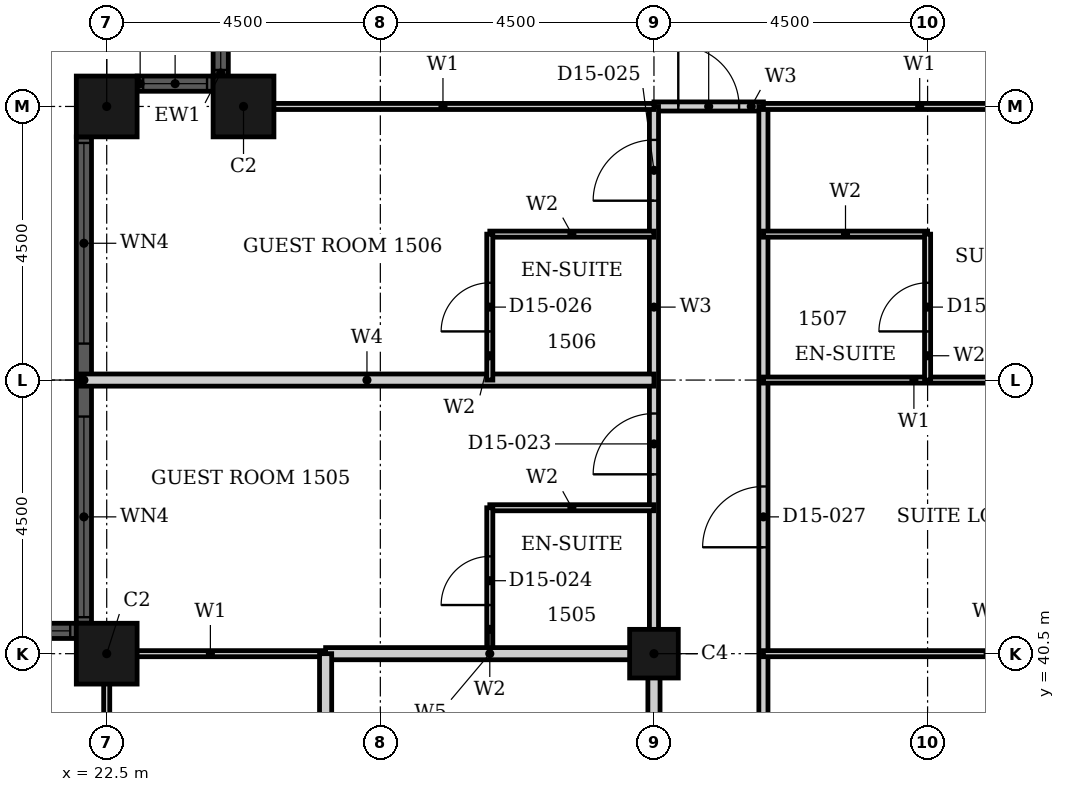
"""IFC4 building model, lengths in metres.
Left out: names, types, materials, properties, quantities, classifications, styles, units other than length and angle.
Written with IfcOpenShell. Run it as: python <this file> out.ifc"""

import sys

from ifc_helpers import new_model, si_unit, direction, frame, frame_2d, origin, origin_2d, place, context, subcontext, project, spatial, rectangle, hollow_rectangle, extrude, element, fill, save


model = new_model("IFC4")
c1 = context("Model", 3, precision=1e-05, world=origin(), true_north=direction((0.0, 1.0)))
c2 = subcontext(c1, "Body", "Model", "MODEL_VIEW")
j1 = project(units=[si_unit("LENGTHUNIT", "METRE"), si_unit("PLANEANGLEUNIT", "RADIAN")], contexts=[c1])
p1 = place(None, origin())
s1 = spatial("IfcSite", under=j1, at=p1, CompositionType="ELEMENT")
p2 = place(p1, origin())
s2 = spatial("IfcBuilding", under=s1, at=p2, CompositionType="ELEMENT")
p3 = place(p2, frame((0.0, 0.0, 67.2)))
s3 = spatial("IfcBuildingStorey", under=s2, at=p3, CompositionType="ELEMENT", Elevation=67.2)
for number, where, z_axis, x_axis in (
    (1, (24.75, 49.5, 0.0), (0.0, 0.0, 1.0), (1.0, 0.0, 0.0)),
    (2, (22.5, 49.5, 0.0), (0.0, 0.0, 1.0), (1.0, 0.0, 0.0)),
    (3, (22.5, 40.5, 0.0), (0.0, 0.0, 1.0), (1.0, 0.0, 0.0)),
):
    element("IfcColumn", number, at=place(p3, frame(where, z_axis=z_axis, x_axis=x_axis)), inside=s3, PredefinedType="COLUMN", context=c2, shape_type="SweptSolid", body=[
        extrude(hollow_rectangle(XDim=1.0, YDim=1.0, WallThickness=0.032, at=origin_2d()), origin(), (0.0, 0.0, 1.0), 3.6),
    ])
p4 = place(p3, frame((31.5, 40.5, 0.0), z_axis=(0.0, 0.0, 1.0), x_axis=(1.0, 0.0, 0.0)))
e4 = element("IfcColumn", 4, at=p4, inside=s3, PredefinedType="COLUMN", context=c2, shape_type="SweptSolid", body=[
    extrude(hollow_rectangle(XDim=0.8, YDim=0.8, WallThickness=0.025, at=origin_2d()), origin(), (0.0, 0.0, 1.0), 3.6),
])
p5 = place(p3, frame((24.375, 51.25, 0.0), z_axis=(0.0, 0.0, 1.0), x_axis=(0.0, -1.0, 0.0)))
e5 = element("IfcWall", 5, at=p5, inside=s3, PredefinedType="SOLIDWALL", context=c2, shape_type="SweptSolid", body=[
    extrude(rectangle(XDim=1.25, YDim=0.25, at=frame_2d((0.625, 0.0))), origin(), (0.0, 0.0, 1.0), 3.6),
])
p6 = place(p5, frame((0.1, 0.0, 0.9)))
e6 = element("IfcOpeningElement", 6, at=p6, cuts=e5, PredefinedType="OPENING", context=c2, shape_type="SweptSolid", body=[
    extrude(rectangle(XDim=1.05, YDim=2.08, at=frame_2d((0.525, 1.04))), frame((0.0, 0.135, 0.0), z_axis=(0.0, -1.0, 0.0), x_axis=(1.0, 0.0, 0.0)), (0.0, 0.0, 1.0), 0.27),
])
p7 = place(p3, frame((24.25, 49.875, 0.0), z_axis=(0.0, 0.0, 1.0), x_axis=(-1.0, 0.0, 0.0)))
e7 = element("IfcWall", 7, at=p7, inside=s3, PredefinedType="SOLIDWALL", context=c2, shape_type="SweptSolid", body=[
    extrude(rectangle(XDim=1.25, YDim=0.25, at=frame_2d((0.625, 0.0))), origin(), (0.0, 0.0, 1.0), 3.6),
])
p8 = place(p7, frame((0.1, 0.0, 0.9)))
e8 = element("IfcOpeningElement", 8, at=p8, cuts=e7, PredefinedType="OPENING", context=c2, shape_type="SweptSolid", body=[
    extrude(rectangle(XDim=1.05, YDim=2.08, at=frame_2d((0.525, 1.04))), frame((0.0, 0.135, 0.0), z_axis=(0.0, -1.0, 0.0), x_axis=(1.0, 0.0, 0.0)), (0.0, 0.0, 1.0), 0.27),
])
p9 = place(p3, frame((22.125, 49.0, 0.0), z_axis=(0.0, 0.0, 1.0), x_axis=(0.0, -1.0, 0.0)))
e9 = element("IfcWall", 9, at=p9, inside=s3, PredefinedType="SOLIDWALL", context=c2, shape_type="SweptSolid", body=[
    extrude(rectangle(XDim=8.0, YDim=0.25, at=frame_2d((4.0, 0.0))), origin(), (0.0, 0.0, 1.0), 3.6),
])
p10 = place(p9, frame((0.1, 0.0, 0.9)))
e10 = element("IfcOpeningElement", 10, at=p10, cuts=e9, PredefinedType="OPENING", context=c2, shape_type="SweptSolid", body=[
    extrude(rectangle(XDim=3.3, YDim=2.08, at=frame_2d((1.65, 1.04))), frame((0.0, 0.135, 0.0), z_axis=(0.0, -1.0, 0.0), x_axis=(1.0, 0.0, 0.0)), (0.0, 0.0, 1.0), 0.27),
])
p11 = place(p9, frame((4.6, 0.0, 0.9)))
e11 = element("IfcOpeningElement", 11, at=p11, cuts=e9, PredefinedType="OPENING", context=c2, shape_type="SweptSolid", body=[
    extrude(rectangle(XDim=3.3, YDim=2.08, at=frame_2d((1.65, 1.04))), frame((0.0, 0.135, 0.0), z_axis=(0.0, -1.0, 0.0), x_axis=(1.0, 0.0, 0.0)), (0.0, 0.0, 1.0), 0.27),
])
p12 = place(p3, frame((22.0, 40.875, 0.0), z_axis=(0.0, 0.0, 1.0), x_axis=(-1.0, 0.0, 0.0)))
e12 = element("IfcWall", 12, at=p12, inside=s3, PredefinedType="SOLIDWALL", context=c2, shape_type="SweptSolid", body=[
    extrude(rectangle(XDim=3.5, YDim=0.25, at=frame_2d((1.75, 0.0))), origin(), (0.0, 0.0, 1.0), 3.6),
])
p13 = place(p12, frame((0.1, 0.0, 0.9)))
e13 = element("IfcOpeningElement", 13, at=p13, cuts=e12, PredefinedType="OPENING", context=c2, shape_type="SweptSolid", body=[
    extrude(rectangle(XDim=3.3, YDim=2.08, at=frame_2d((1.65, 1.04))), frame((0.0, 0.135, 0.0), z_axis=(0.0, -1.0, 0.0), x_axis=(1.0, 0.0, 0.0)), (0.0, 0.0, 1.0), 0.27),
])
p14 = place(p3, frame((31.5, 49.5, 0.0), z_axis=(0.0, 0.0, 1.0), x_axis=(1.0, 0.0, 0.0)))
e14 = element("IfcWall", 14, at=p14, inside=s3, PredefinedType="PARTITIONING", context=c2, shape_type="SweptSolid", body=[
    extrude(rectangle(XDim=1.8, YDim=0.15, at=frame_2d((0.9, 0.0))), origin(), (0.0, 0.0, 1.0), 3.3),
])
p15 = place(p14, frame((0.4, 0.0, 0.0)))
e15 = element("IfcOpeningElement", 15, at=p15, cuts=e14, PredefinedType="OPENING", context=c2, shape_type="SweptSolid", body=[
    extrude(rectangle(XDim=1.0, YDim=2.1, at=frame_2d((0.5, 1.05))), frame((0.0, 0.085, 0.0), z_axis=(0.0, -1.0, 0.0), x_axis=(1.0, 0.0, 0.0)), (0.0, 0.0, 1.0), 0.17),
])
p16 = place(p3, frame((31.5, 40.5, 0.0), z_axis=(0.0, 0.0, 1.0), x_axis=(0.0, 1.0, 0.0)))
e16 = element("IfcWall", 16, at=p16, inside=s3, PredefinedType="PARTITIONING", context=c2, shape_type="SweptSolid", body=[
    extrude(rectangle(XDim=9.0, YDim=0.15, at=frame_2d((4.5, 0.0))), origin(), (0.0, 0.0, 1.0), 2.58),
])
p17 = place(p16, frame((2.95, 0.0, 0.0)))
e17 = element("IfcOpeningElement", 17, at=p17, cuts=e16, PredefinedType="OPENING", context=c2, shape_type="SweptSolid", body=[
    extrude(rectangle(XDim=1.0, YDim=2.1, at=frame_2d((0.5, 1.05))), frame((0.0, 0.085, 0.0), z_axis=(0.0, -1.0, 0.0), x_axis=(1.0, 0.0, 0.0)), (0.0, 0.0, 1.0), 0.17),
])
p18 = place(p16, frame((7.45, 0.0, 0.0)))
e18 = element("IfcOpeningElement", 18, at=p18, cuts=e16, PredefinedType="OPENING", context=c2, shape_type="SweptSolid", body=[
    extrude(rectangle(XDim=1.0, YDim=2.1, at=frame_2d((0.5, 1.05))), frame((0.0, 0.085, 0.0), z_axis=(0.0, -1.0, 0.0), x_axis=(1.0, 0.0, 0.0)), (0.0, 0.0, 1.0), 0.17),
])
p19 = place(p3, frame((33.3, 33.3, 0.0), z_axis=(0.0, 0.0, 1.0), x_axis=(0.0, 1.0, 0.0)))
e19 = element("IfcWall", 19, at=p19, inside=s3, PredefinedType="PARTITIONING", context=c2, shape_type="SweptSolid", body=[
    extrude(rectangle(XDim=16.2, YDim=0.15, at=frame_2d((8.1, 0.0))), origin(), (0.0, 0.0, 1.0), 3.3),
])
p20 = place(p19, frame((8.95, 0.0, 0.0)))
e20 = element("IfcOpeningElement", 20, at=p20, cuts=e19, PredefinedType="OPENING", context=c2, shape_type="SweptSolid", body=[
    extrude(rectangle(XDim=1.0, YDim=2.1, at=frame_2d((0.5, 1.05))), frame((0.0, 0.085, 0.0), z_axis=(0.0, -1.0, 0.0), x_axis=(1.0, 0.0, 0.0)), (0.0, 0.0, 1.0), 0.17),
])
p21 = place(p3, frame((22.31, 40.5, 0.0), z_axis=(0.0, 0.0, 1.0), x_axis=(1.0, 0.0, 0.0)))
e21 = element("IfcWall", 21, at=p21, inside=s3, PredefinedType="PARTITIONING", context=c2, shape_type="SweptSolid", body=[
    extrude(rectangle(XDim=3.79, YDim=0.1, at=frame_2d((1.895, 0.0))), origin(), (0.0, 0.0, 1.0), 2.38),
])
p22 = place(p3, frame((33.3, 40.5, 0.0), z_axis=(0.0, 0.0, 1.0), x_axis=(1.0, 0.0, 0.0)))
e22 = element("IfcWall", 22, at=p22, inside=s3, PredefinedType="PARTITIONING", context=c2, shape_type="SweptSolid", body=[
    extrude(rectangle(XDim=7.39, YDim=0.1, at=frame_2d((3.695, 0.0))), origin(), (0.0, 0.0, 1.0), 2.38),
])
p23 = place(p3, frame((33.3, 45.0, 0.0), z_axis=(0.0, 0.0, 1.0), x_axis=(1.0, 0.0, 0.0)))
e23 = element("IfcWall", 23, at=p23, inside=s3, PredefinedType="PARTITIONING", context=c2, shape_type="SweptSolid", body=[
    extrude(rectangle(XDim=7.64, YDim=0.1, at=frame_2d((3.82, 0.0))), origin(), (0.0, 0.0, 1.0), 3.3),
])
p24 = place(p23, frame((4.95, 0.0, 0.0)))
e24 = element("IfcOpeningElement", 24, at=p24, cuts=e23, PredefinedType="OPENING", context=c2, shape_type="SweptSolid", body=[
    extrude(rectangle(XDim=0.9, YDim=2.1, at=frame_2d((0.45, 1.05))), frame((0.0, 0.06, 0.0), z_axis=(0.0, -1.0, 0.0), x_axis=(1.0, 0.0, 0.0)), (0.0, 0.0, 1.0), 0.12),
])
p25 = place(p3, frame((24.56, 49.5, 0.0), z_axis=(0.0, 0.0, 1.0), x_axis=(1.0, 0.0, 0.0)))
e25 = element("IfcWall", 25, at=p25, inside=s3, PredefinedType="PARTITIONING", context=c2, shape_type="SweptSolid", body=[
    extrude(rectangle(XDim=6.94, YDim=0.1, at=frame_2d((3.47, 0.0))), origin(), (0.0, 0.0, 1.0), 3.3),
])
p26 = place(p3, frame((33.3, 49.5, 0.0), z_axis=(0.0, 0.0, 1.0), x_axis=(1.0, 0.0, 0.0)))
e26 = element("IfcWall", 26, at=p26, inside=s3, PredefinedType="PARTITIONING", context=c2, shape_type="SweptSolid", body=[
    extrude(rectangle(XDim=5.14, YDim=0.1, at=frame_2d((2.57, 0.0))), origin(), (0.0, 0.0, 1.0), 3.3),
])
p27 = place(p3, frame((22.5, 33.3, 0.0), z_axis=(0.0, 0.0, 1.0), x_axis=(0.0, 1.0, 0.0)))
e27 = element("IfcWall", 27, at=p27, inside=s3, PredefinedType="PARTITIONING", context=c2, shape_type="SweptSolid", body=[
    extrude(rectangle(XDim=7.39, YDim=0.1, at=frame_2d((3.695, 0.0))), origin(), (0.0, 0.0, 1.0), 3.3),
])
p28 = place(p3, frame((22.06, 45.0, 0.0), z_axis=(0.0, 0.0, 1.0), x_axis=(1.0, 0.0, 0.0)))
e28 = element("IfcWall", 28, at=p28, inside=s3, PredefinedType="PARTITIONING", context=c2, shape_type="SweptSolid", body=[
    extrude(rectangle(XDim=9.44, YDim=0.2, at=frame_2d((4.72, 0.0))), origin(), (0.0, 0.0, 1.0), 3.3),
])
for number, where, z_axis, x_axis in (
    (29, (28.8, 42.9, 0.0), (0.0, 0.0, 1.0), (1.0, 0.0, 0.0)),
    (30, (28.8, 47.4, 0.0), (0.0, 0.0, 1.0), (1.0, 0.0, 0.0)),
    (31, (33.3, 47.4, 0.0), (0.0, 0.0, 1.0), (1.0, 0.0, 0.0)),
):
    element("IfcWall", number, at=place(p3, frame(where, z_axis=z_axis, x_axis=x_axis)), inside=s3, PredefinedType="PARTITIONING", context=c2, shape_type="SweptSolid", body=[
        extrude(rectangle(XDim=2.7, YDim=0.1, at=frame_2d((1.35, 0.0))), origin(), (0.0, 0.0, 1.0), 3.3),
    ])
p29 = place(p3, frame((28.8, 40.5, 0.0), z_axis=(0.0, 0.0, 1.0), x_axis=(0.0, 1.0, 0.0)))
e32 = element("IfcWall", 32, at=p29, inside=s3, PredefinedType="PARTITIONING", context=c2, shape_type="SweptSolid", body=[
    extrude(rectangle(XDim=2.4, YDim=0.1, at=frame_2d((1.2, 0.0))), origin(), (0.0, 0.0, 1.0), 3.3),
])
p30 = place(p29, frame((0.8, 0.0, 0.0)))
e33 = element("IfcOpeningElement", 33, at=p30, cuts=e32, PredefinedType="OPENING", context=c2, shape_type="SweptSolid", body=[
    extrude(rectangle(XDim=0.8, YDim=2.1, at=frame_2d((0.4, 1.05))), frame((0.0, 0.06, 0.0), z_axis=(0.0, -1.0, 0.0), x_axis=(1.0, 0.0, 0.0)), (0.0, 0.0, 1.0), 0.12),
])
p31 = place(p3, frame((28.8, 45.0, 0.0), z_axis=(0.0, 0.0, 1.0), x_axis=(0.0, 1.0, 0.0)))
e34 = element("IfcWall", 34, at=p31, inside=s3, PredefinedType="PARTITIONING", context=c2, shape_type="SweptSolid", body=[
    extrude(rectangle(XDim=2.4, YDim=0.1, at=frame_2d((1.2, 0.0))), origin(), (0.0, 0.0, 1.0), 3.3),
])
p32 = place(p31, frame((0.8, 0.0, 0.0)))
e35 = element("IfcOpeningElement", 35, at=p32, cuts=e34, PredefinedType="OPENING", context=c2, shape_type="SweptSolid", body=[
    extrude(rectangle(XDim=0.8, YDim=2.1, at=frame_2d((0.4, 1.05))), frame((0.0, 0.06, 0.0), z_axis=(0.0, -1.0, 0.0), x_axis=(1.0, 0.0, 0.0)), (0.0, 0.0, 1.0), 0.12),
])
p33 = place(p3, frame((36.0, 45.0, 0.0), z_axis=(0.0, 0.0, 1.0), x_axis=(0.0, 1.0, 0.0)))
e36 = element("IfcWall", 36, at=p33, inside=s3, PredefinedType="PARTITIONING", context=c2, shape_type="SweptSolid", body=[
    extrude(rectangle(XDim=2.4, YDim=0.1, at=frame_2d((1.2, 0.0))), origin(), (0.0, 0.0, 1.0), 2.58),
])
p34 = place(p33, frame((0.8, 0.0, 0.0)))
e37 = element("IfcOpeningElement", 37, at=p34, cuts=e36, PredefinedType="OPENING", context=c2, shape_type="SweptSolid", body=[
    extrude(rectangle(XDim=0.8, YDim=2.1, at=frame_2d((0.4, 1.05))), frame((0.0, 0.06, 0.0), z_axis=(0.0, -1.0, 0.0), x_axis=(1.0, 0.0, 0.0)), (0.0, 0.0, 1.0), 0.12),
])
p35 = place(p3, frame((26.1, 40.5, 0.0), z_axis=(0.0, 0.0, 1.0), x_axis=(1.0, 0.0, 0.0)))
e38 = element("IfcWall", 38, at=p35, inside=s3, PredefinedType="PARTITIONING", context=c2, shape_type="SweptSolid", body=[
    extrude(rectangle(XDim=5.4, YDim=0.2, at=frame_2d((2.7, 0.0))), origin(), (0.0, 0.0, 1.0), 2.38),
])
for number, where, z_axis, x_axis in (
    (39, (26.1, 33.3, 0.0), (0.0, 0.0, 1.0), (0.0, 1.0, 0.0)),
    (40, (31.5, 33.3, 0.0), (0.0, 0.0, 1.0), (0.0, 1.0, 0.0)),
):
    element("IfcWall", number, at=place(p3, frame(where, z_axis=z_axis, x_axis=x_axis)), inside=s3, PredefinedType="PARTITIONING", context=c2, shape_type="SweptSolid", body=[
        extrude(rectangle(XDim=7.2, YDim=0.2, at=frame_2d((3.6, 0.0))), origin(), (0.0, 0.0, 1.0), 3.3),
    ])
p36 = place(p6, origin())
e41 = element("IfcWindow", 41, at=p36, inside=s3, PartitioningType="SINGLE_PANEL", PredefinedType="WINDOW", context=c2, shape_type="SweptSolid", body=[
    extrude(rectangle(XDim=1.05, YDim=2.08, at=frame_2d((0.525, 1.04))), frame((0.0, 0.03, 0.0), z_axis=(0.0, -1.0, 0.0), x_axis=(1.0, 0.0, 0.0)), (0.0, 0.0, 1.0), 0.06),
])
fill(e6, e41)
p37 = place(p8, origin())
e42 = element("IfcWindow", 42, at=p37, inside=s3, PartitioningType="SINGLE_PANEL", PredefinedType="WINDOW", context=c2, shape_type="SweptSolid", body=[
    extrude(rectangle(XDim=1.05, YDim=2.08, at=frame_2d((0.525, 1.04))), frame((0.0, 0.03, 0.0), z_axis=(0.0, -1.0, 0.0), x_axis=(1.0, 0.0, 0.0)), (0.0, 0.0, 1.0), 0.06),
])
fill(e8, e42)
p38 = place(p10, origin())
e43 = element("IfcWindow", 43, at=p38, inside=s3, PartitioningType="SINGLE_PANEL", PredefinedType="WINDOW", context=c2, shape_type="SweptSolid", body=[
    extrude(rectangle(XDim=3.3, YDim=2.08, at=frame_2d((1.65, 1.04))), frame((0.0, 0.03, 0.0), z_axis=(0.0, -1.0, 0.0), x_axis=(1.0, 0.0, 0.0)), (0.0, 0.0, 1.0), 0.06),
])
fill(e10, e43)
p39 = place(p11, origin())
e44 = element("IfcWindow", 44, at=p39, inside=s3, PartitioningType="SINGLE_PANEL", PredefinedType="WINDOW", context=c2, shape_type="SweptSolid", body=[
    extrude(rectangle(XDim=3.3, YDim=2.08, at=frame_2d((1.65, 1.04))), frame((0.0, 0.03, 0.0), z_axis=(0.0, -1.0, 0.0), x_axis=(1.0, 0.0, 0.0)), (0.0, 0.0, 1.0), 0.06),
])
fill(e11, e44)
p40 = place(p13, origin())
e45 = element("IfcWindow", 45, at=p40, inside=s3, PartitioningType="SINGLE_PANEL", PredefinedType="WINDOW", context=c2, shape_type="SweptSolid", body=[
    extrude(rectangle(XDim=3.3, YDim=2.08, at=frame_2d((1.65, 1.04))), frame((0.0, 0.03, 0.0), z_axis=(0.0, -1.0, 0.0), x_axis=(1.0, 0.0, 0.0)), (0.0, 0.0, 1.0), 0.06),
])
fill(e13, e45)
p41 = place(p17, origin())
e46 = element("IfcDoor", 46, at=p41, inside=s3, OperationType="SINGLE_SWING_RIGHT", PredefinedType="DOOR", context=c2, shape_type="SweptSolid", body=[
    extrude(rectangle(XDim=1.0, YDim=2.1, at=frame_2d((0.5, 1.05))), frame((0.0, 0.025, 0.0), z_axis=(0.0, -1.0, 0.0), x_axis=(1.0, 0.0, 0.0)), (0.0, 0.0, 1.0), 0.05),
])
fill(e17, e46)
p42 = place(p30, origin())
e47 = element("IfcDoor", 47, at=p42, inside=s3, OperationType="SINGLE_SWING_RIGHT", PredefinedType="DOOR", context=c2, shape_type="SweptSolid", body=[
    extrude(rectangle(XDim=0.8, YDim=2.1, at=frame_2d((0.4, 1.05))), frame((0.0, 0.025, 0.0), z_axis=(0.0, -1.0, 0.0), x_axis=(1.0, 0.0, 0.0)), (0.0, 0.0, 1.0), 0.05),
])
fill(e33, e47)
p43 = place(p18, origin())
e48 = element("IfcDoor", 48, at=p43, inside=s3, OperationType="SINGLE_SWING_RIGHT", PredefinedType="DOOR", context=c2, shape_type="SweptSolid", body=[
    extrude(rectangle(XDim=1.0, YDim=2.1, at=frame_2d((0.5, 1.05))), frame((0.0, 0.025, 0.0), z_axis=(0.0, -1.0, 0.0), x_axis=(1.0, 0.0, 0.0)), (0.0, 0.0, 1.0), 0.05),
])
fill(e18, e48)
p44 = place(p32, origin())
e49 = element("IfcDoor", 49, at=p44, inside=s3, OperationType="SINGLE_SWING_RIGHT", PredefinedType="DOOR", context=c2, shape_type="SweptSolid", body=[
    extrude(rectangle(XDim=0.8, YDim=2.1, at=frame_2d((0.4, 1.05))), frame((0.0, 0.025, 0.0), z_axis=(0.0, -1.0, 0.0), x_axis=(1.0, 0.0, 0.0)), (0.0, 0.0, 1.0), 0.05),
])
fill(e35, e49)
p45 = place(p20, origin())
e50 = element("IfcDoor", 50, at=p45, inside=s3, OperationType="SINGLE_SWING_LEFT", PredefinedType="DOOR", context=c2, shape_type="SweptSolid", body=[
    extrude(rectangle(XDim=1.0, YDim=2.1, at=frame_2d((0.5, 1.05))), frame((0.0, 0.025, 0.0), z_axis=(0.0, -1.0, 0.0), x_axis=(1.0, 0.0, 0.0)), (0.0, 0.0, 1.0), 0.05),
])
fill(e20, e50)
p46 = place(p34, origin())
e51 = element("IfcDoor", 51, at=p46, inside=s3, OperationType="SINGLE_SWING_RIGHT", PredefinedType="DOOR", context=c2, shape_type="SweptSolid", body=[
    extrude(rectangle(XDim=0.8, YDim=2.1, at=frame_2d((0.4, 1.05))), frame((0.0, 0.025, 0.0), z_axis=(0.0, -1.0, 0.0), x_axis=(1.0, 0.0, 0.0)), (0.0, 0.0, 1.0), 0.05),
])
fill(e37, e51)
p47 = place(p15, origin())
e52 = element("IfcDoor", 52, at=p47, inside=s3, OperationType="SINGLE_SWING_RIGHT", PredefinedType="DOOR", context=c2, shape_type="SweptSolid", body=[
    extrude(rectangle(XDim=1.0, YDim=2.1, at=frame_2d((0.5, 1.05))), frame((0.0, 0.025, 0.0), z_axis=(0.0, -1.0, 0.0), x_axis=(1.0, 0.0, 0.0)), (0.0, 0.0, 1.0), 0.05),
])
fill(e15, e52)
save(model, sys.argv[1])
